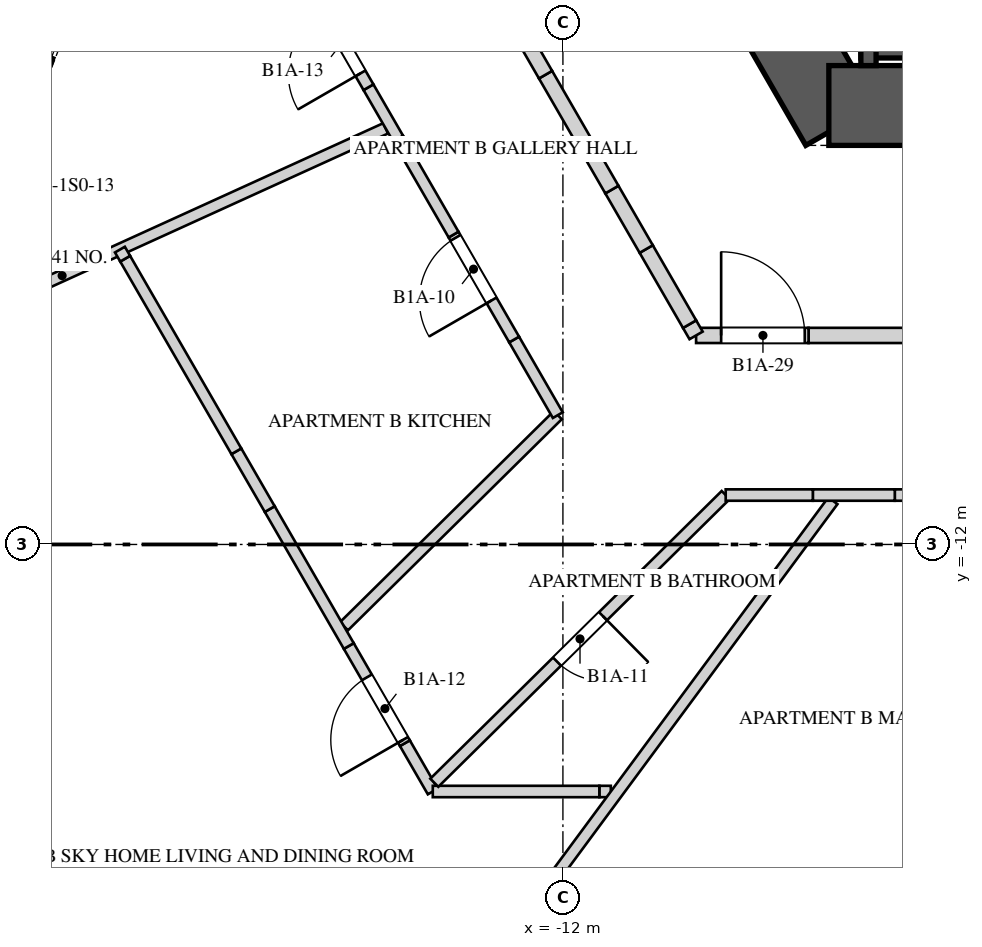
"""IFC4 building model, lengths in metres.
Left out: names, types, materials, properties, quantities, classifications, styles, units other than length and angle.
Written with IfcOpenShell. Run it as: python <this file> out.ifc"""

import sys

from ifc_helpers import new_model, si_unit, direction, frame, frame_2d, origin, place, context, subcontext, project, spatial, polyline, rectangle, outline, extrude, element, fill, save


model = new_model("IFC4")
c1 = context("Model", 3, precision=1e-05, world=origin(), true_north=direction((0.0, 1.0)))
c2 = subcontext(c1, "Body", "Model", "MODEL_VIEW")
j1 = project(units=[si_unit("LENGTHUNIT", "METRE"), si_unit("PLANEANGLEUNIT", "RADIAN")], contexts=[c1])
p1 = place(None, origin())
s1 = spatial("IfcSite", under=j1, at=p1, CompositionType="ELEMENT")
p2 = place(p1, origin())
s2 = spatial("IfcBuilding", under=s1, at=p2, CompositionType="ELEMENT")
p3 = place(p2, frame((0.0, 0.0, 51.2)))
s3 = spatial("IfcBuildingStorey", under=s2, at=p3, CompositionType="ELEMENT", Elevation=51.2)
p4 = place(p3, frame((-9.793, -3.988, 0.0), z_axis=(0.0, 0.0, 1.0), x_axis=(0.499995765644, -0.866027848477, 0.0)))
e1 = element("IfcWall", 1, at=p4, inside=s3, PredefinedType="SHEAR", context=c2, shape_type="SweptSolid", body=[
    extrude(rectangle(XDim=2.887, YDim=1.05, at=frame_2d((1.443, 0.0))), origin(), (0.0, 0.0, 1.0), 4.0),
])
p5 = place(p3, frame((-8.501, -6.225, 0.0), z_axis=(0.0, 0.0, 1.0), x_axis=(1.0, 0.0, 0.0)))
e2 = element("IfcWall", 2, at=p5, inside=s3, PredefinedType="SHEAR", context=c2, shape_type="SweptSolid", body=[
    extrude(rectangle(XDim=17.003, YDim=1.05, at=frame_2d((8.501, 0.0))), origin(), (0.0, 0.0, 1.0), 4.0),
])
p6 = place(p5, frame((6.707, 0.0, 0.0)))
e3 = element("IfcOpeningElement", 3, at=p6, cuts=e2, PredefinedType="OPENING", context=c2, shape_type="SweptSolid", body=[
    extrude(rectangle(XDim=1.0, YDim=2.4, at=frame_2d((0.5, 1.2))), frame((0.0, 0.535, 0.0), z_axis=(0.0, -1.0, 0.0), x_axis=(1.0, 0.0, 0.0)), (0.0, 0.0, 1.0), 1.07),
])
p7 = place(p3, frame((-21.601, -4.65, 0.0), z_axis=(0.0, 0.0, 1.0), x_axis=(0.933580593625, -0.358367514161, 0.0)))
e4 = element("IfcWall", 4, at=p7, inside=s3, PredefinedType="SOLIDWALL", context=c2, shape_type="SweptSolid", body=[
    extrude(rectangle(XDim=3.05, YDim=0.3, at=frame_2d((1.525, 0.0))), origin(), (0.0, 0.0, 1.0), 3.3),
])
p8 = place(p3, frame((-8.08, -5.475, 0.0), z_axis=(0.0, 0.0, 1.0), x_axis=(1.0, 0.0, 0.0)))
e5 = element("IfcWall", 5, at=p8, inside=s3, PredefinedType="SOLIDWALL", context=c2, shape_type="SweptSolid", body=[
    extrude(rectangle(XDim=6.2, YDim=0.25, at=frame_2d((3.1, 0.0))), origin(), (0.0, 0.0, 1.0), 3.65),
])
p9 = place(p3, frame((-7.98, -2.422, 0.0), z_axis=(0.0, 0.0, 1.0), x_axis=(0.0, -1.0, 0.0)))
e6 = element("IfcWall", 6, at=p9, inside=s3, PredefinedType="SOLIDWALL", context=c2, shape_type="SweptSolid", body=[
    extrude(rectangle(XDim=3.278, YDim=0.2, at=frame_2d((1.639, 0.0))), origin(), (0.0, 0.0, 1.0), 3.65),
])
p10 = place(p3, frame((-22.845, -10.402, 0.0), z_axis=(0.0, 0.0, 1.0), x_axis=(0.910101702386, 0.414384955463, 0.0)))
e7 = element("IfcWall", 7, at=p10, inside=s3, PredefinedType="PARTITIONING", context=c2, shape_type="SweptSolid", body=[
    extrude(rectangle(XDim=9.354, YDim=0.15, at=frame_2d((4.677, 0.0))), origin(), (0.0, 0.0, 1.0), 2.75),
])
p11 = place(p3, frame((-14.88, -13.076, 0.0), z_axis=(0.0, 0.0, 1.0), x_axis=(0.711570024915, 0.702615186032, 0.0)))
e8 = element("IfcWall", 8, at=p11, inside=s3, PredefinedType="PARTITIONING", context=c2, shape_type="SweptSolid", body=[
    extrude(rectangle(XDim=3.953, YDim=0.15, at=frame_2d((1.977, 0.0))), origin(), (0.0, 0.0, 1.0), 3.65),
])
p12 = place(p3, frame((-13.712, -15.25, 0.0), z_axis=(0.0, 0.0, 1.0), x_axis=(-0.500039236423, 0.86600274944, 0.0)))
e9 = element("IfcWall", 9, at=p12, inside=s3, PredefinedType="PARTITIONING", context=c2, shape_type="SweptSolid", body=[
    extrude(rectangle(XDim=0.734, YDim=0.15, at=frame_2d((0.367, 0.0))), origin(), (0.0, 0.0, 1.0), 3.65),
])
p13 = place(p3, frame((-14.079, -14.615, 0.0), z_axis=(0.0, 0.0, 1.0), x_axis=(-0.499927643558, 0.866067174765, 0.0)))
e10 = element("IfcWall", 10, at=p13, inside=s3, PredefinedType="PARTITIONING", context=c2, shape_type="SweptSolid", body=[
    extrude(outline(polyline([(0.0, 0.0), (1.476, 0.0), (1.476, 2.55), (0.577, 2.55), (0.577, 3.65), (0.0, 3.65), (0.0, 0.0)])), frame((0.0, 0.075, 0.0), z_axis=(0.0, -1.0, 0.0), x_axis=(1.0, 0.0, 0.0)), (0.0, 0.0, 1.0), 0.15),
])
p14 = place(p13, frame((0.05, 0.0, 0.0)))
e11 = element("IfcOpeningElement", 11, at=p14, cuts=e10, PredefinedType="OPENING", context=c2, shape_type="SweptSolid", body=[
    extrude(rectangle(XDim=0.95, YDim=2.4, at=frame_2d((0.475, 1.2))), frame((0.0, 0.085, 0.0), z_axis=(0.0, -1.0, 0.0), x_axis=(1.0, 0.0, 0.0)), (0.0, 0.0, 1.0), 0.17),
])
p15 = place(p3, frame((-14.817, -13.336, 0.0), z_axis=(0.0, 0.0, 1.0), x_axis=(-0.500027264788, 0.866009661879, 0.0)))
e12 = element("IfcWall", 12, at=p15, inside=s3, PredefinedType="PARTITIONING", context=c2, shape_type="SweptSolid", body=[
    extrude(rectangle(XDim=2.08, YDim=0.15, at=frame_2d((1.04, 0.0))), origin(), (0.0, 0.0, 1.0), 3.65),
])
p16 = place(p3, frame((-15.857, -11.535, 0.0), z_axis=(0.0, 0.0, 1.0), x_axis=(-0.49990697594, 0.86607910459, 0.0)))
e13 = element("IfcWall", 13, at=p16, inside=s3, PredefinedType="PARTITIONING", context=c2, shape_type="SweptSolid", body=[
    extrude(rectangle(XDim=0.878, YDim=0.15, at=frame_2d((0.439, 0.0))), origin(), (0.0, 0.0, 1.0), 2.55),
])
p17 = place(p3, frame((-16.296, -10.774, 0.0), z_axis=(0.0, 0.0, 1.0), x_axis=(-0.499980071345, 0.866036909293, 0.0)))
e14 = element("IfcWall", 14, at=p17, inside=s3, PredefinedType="PARTITIONING", context=c2, shape_type="SweptSolid", body=[
    extrude(rectangle(XDim=2.926, YDim=0.15, at=frame_2d((1.463, 0.0))), origin(), (0.0, 0.0, 1.0), 3.65),
])
p18 = place(p3, frame((-17.759, -8.24, 0.0), z_axis=(0.0, 0.0, 1.0), x_axis=(-0.500896724159, 0.865507060472, 0.0)))
e15 = element("IfcWall", 15, at=p18, inside=s3, PredefinedType="PARTITIONING", context=c2, shape_type="SweptSolid", body=[
    extrude(rectangle(XDim=0.138, YDim=0.15, at=frame_2d((0.069, 0.0))), origin(), (0.0, 0.0, 1.0), 2.75),
])
p19 = place(p3, frame((-12.067, -10.299, 0.0), z_axis=(0.0, 0.0, 1.0), x_axis=(-0.499955427682, 0.866051136095, 0.0)))
e16 = element("IfcWall", 16, at=p19, inside=s3, PredefinedType="PARTITIONING", context=c2, shape_type="SweptSolid", body=[
    extrude(rectangle(XDim=1.149, YDim=0.15, at=frame_2d((0.574, 0.0))), origin(), (0.0, 0.0, 1.0), 3.65),
])
p20 = place(p3, frame((-12.642, -9.304, 0.0), z_axis=(0.0, 0.0, 1.0), x_axis=(-0.499961121316, 0.86604784924, 0.0)))
e17 = element("IfcWall", 17, at=p20, inside=s3, PredefinedType="PARTITIONING", context=c2, shape_type="SweptSolid", body=[
    extrude(outline(polyline([(0.0, 0.0), (1.594, 0.0), (1.594, 3.65), (0.878, 3.65), (0.878, 2.55), (0.0, 2.55), (0.0, 0.0)])), frame((0.0, 0.075, 0.0), z_axis=(0.0, -1.0, 0.0), x_axis=(1.0, 0.0, 0.0)), (0.0, 0.0, 1.0), 0.15),
])
p21 = place(p20, frame((0.594, 0.0, 0.0)))
e18 = element("IfcOpeningElement", 18, at=p21, cuts=e17, PredefinedType="OPENING", context=c2, shape_type="SweptSolid", body=[
    extrude(rectangle(XDim=0.95, YDim=2.4, at=frame_2d((0.475, 1.2))), frame((0.0, 0.085, 0.0), z_axis=(0.0, -1.0, 0.0), x_axis=(1.0, 0.0, 0.0)), (0.0, 0.0, 1.0), 0.17),
])
p22 = place(p3, frame((-13.439, -7.923, 0.0), z_axis=(0.0, 0.0, 1.0), x_axis=(-0.500026652407, 0.866010015463, 0.0)))
e19 = element("IfcWall", 19, at=p22, inside=s3, PredefinedType="PARTITIONING", context=c2, shape_type="SweptSolid", body=[
    extrude(rectangle(XDim=1.459, YDim=0.15, at=frame_2d((0.729, 0.0))), origin(), (0.0, 0.0, 1.0), 3.65),
])
p23 = place(p3, frame((-14.168, -6.66, 0.0), z_axis=(0.0, 0.0, 1.0), x_axis=(-0.500011542666, 0.866018739521, 0.0)))
e20 = element("IfcWall", 20, at=p23, inside=s3, PredefinedType="PARTITIONING", context=c2, shape_type="SweptSolid", body=[
    extrude(rectangle(XDim=0.78, YDim=0.15, at=frame_2d((0.39, 0.0))), origin(), (0.0, 0.0, 1.0), 2.75),
])
p24 = place(p3, frame((-14.558, -5.985, 0.0), z_axis=(0.0, 0.0, 1.0), x_axis=(-0.499993265928, 0.866029291668, 0.0)))
e21 = element("IfcWall", 21, at=p24, inside=s3, PredefinedType="PARTITIONING", context=c2, shape_type="SweptSolid", body=[
    extrude(rectangle(XDim=2.003, YDim=0.15, at=frame_2d((1.001, 0.0))), origin(), (0.0, 0.0, 1.0), 3.65),
])
p25 = place(p24, frame((0.211, 0.0, 0.0)))
e22 = element("IfcOpeningElement", 22, at=p25, cuts=e21, PredefinedType="OPENING", context=c2, shape_type="SweptSolid", body=[
    extrude(rectangle(XDim=0.95, YDim=2.4, at=frame_2d((0.475, 1.2))), frame((0.0, 0.085, 0.0), z_axis=(0.0, -1.0, 0.0), x_axis=(1.0, 0.0, 0.0)), (0.0, 0.0, 1.0), 0.17),
])
p26 = place(p3, frame((-11.37, -15.25, 0.0), z_axis=(0.0, 0.0, 1.0), x_axis=(-1.0, 0.0, 0.0)))
e23 = element("IfcWall", 23, at=p26, inside=s3, PredefinedType="PARTITIONING", context=c2, shape_type="SweptSolid", body=[
    extrude(rectangle(XDim=0.151, YDim=0.15, at=frame_2d((0.075, 0.0))), origin(), (0.0, 0.0, 1.0), 2.55),
])
p27 = place(p3, frame((-11.521, -15.25, 0.0), z_axis=(0.0, 0.0, 1.0), x_axis=(-1.0, 0.0, 0.0)))
e24 = element("IfcWall", 24, at=p27, inside=s3, PredefinedType="PARTITIONING", context=c2, shape_type="SweptSolid", body=[
    extrude(rectangle(XDim=2.192, YDim=0.15, at=frame_2d((1.096, 0.0))), origin(), (0.0, 0.0, 1.0), 3.65),
])
p28 = place(p3, frame((-9.858, -11.35, 0.0), z_axis=(0.0, 0.0, 1.0), x_axis=(-0.711601660906, -0.702583145397, 0.0)))
e25 = element("IfcWall", 25, at=p28, inside=s3, PredefinedType="PARTITIONING", context=c2, shape_type="SweptSolid", body=[
    extrude(rectangle(XDim=5.387, YDim=0.15, at=frame_2d((2.694, 0.0))), origin(), (0.0, 0.0, 1.0), 3.65),
])
p29 = place(p28, frame((2.269, 0.0, 0.0)))
e26 = element("IfcOpeningElement", 26, at=p29, cuts=e25, PredefinedType="OPENING", context=c2, shape_type="SweptSolid", body=[
    extrude(rectangle(XDim=0.85, YDim=2.4, at=frame_2d((0.425, 1.2))), frame((0.0, 0.085, 0.0), z_axis=(0.0, -1.0, 0.0), x_axis=(1.0, 0.0, 0.0)), (0.0, 0.0, 1.0), 0.17),
])
p30 = place(p3, frame((-8.448, -11.425, 0.0), z_axis=(0.0, 0.0, 1.0), x_axis=(-0.594567506499, -0.804045695353, 0.0)))
e27 = element("IfcWall", 27, at=p30, inside=s3, PredefinedType="PARTITIONING", context=c2, shape_type="SweptSolid", body=[
    extrude(rectangle(XDim=10.893, YDim=0.15, at=frame_2d((5.446, 0.0))), origin(), (0.0, 0.0, 1.0), 2.55),
])
p31 = place(p3, frame((-3.957, -11.35, 0.0), z_axis=(0.0, 0.0, 1.0), x_axis=(-1.0, 0.0, 0.0)))
e28 = element("IfcWall", 28, at=p31, inside=s3, PredefinedType="PARTITIONING", context=c2, shape_type="SweptSolid", body=[
    extrude(rectangle(XDim=3.677, YDim=0.15, at=frame_2d((1.839, 0.0))), origin(), (0.0, 0.0, 1.0), 3.65),
])
p32 = place(p31, frame((1.604, 0.0, 0.0)))
e29 = element("IfcOpeningElement", 29, at=p32, cuts=e28, PredefinedType="OPENING", context=c2, shape_type="SweptSolid", body=[
    extrude(rectangle(XDim=0.95, YDim=2.4, at=frame_2d((0.475, 1.2))), frame((0.0, 0.085, 0.0), z_axis=(0.0, -1.0, 0.0), x_axis=(1.0, 0.0, 0.0)), (0.0, 0.0, 1.0), 0.17),
])
p33 = place(p3, frame((-7.634, -11.35, 0.0), z_axis=(0.0, 0.0, 1.0), x_axis=(-1.0, 0.0, 0.0)))
e30 = element("IfcWall", 30, at=p33, inside=s3, PredefinedType="PARTITIONING", context=c2, shape_type="SweptSolid", body=[
    extrude(rectangle(XDim=1.078, YDim=0.15, at=frame_2d((0.539, 0.0))), origin(), (0.0, 0.0, 1.0), 2.55),
])
p34 = place(p3, frame((-8.712, -11.35, 0.0), z_axis=(0.0, 0.0, 1.0), x_axis=(-1.0, 0.0, 0.0)))
e31 = element("IfcWall", 31, at=p34, inside=s3, PredefinedType="PARTITIONING", context=c2, shape_type="SweptSolid", body=[
    extrude(rectangle(XDim=1.146, YDim=0.15, at=frame_2d((0.573, 0.0))), origin(), (0.0, 0.0, 1.0), 3.65),
])
p35 = place(p3, frame((-7.215, -9.25, 0.0), z_axis=(0.0, 0.0, 1.0), x_axis=(-1.0, 0.0, 0.0)))
e32 = element("IfcWall", 32, at=p35, inside=s3, PredefinedType="SOLIDWALL", context=c2, shape_type="SweptSolid", body=[
    extrude(rectangle(XDim=1.553, YDim=0.2, at=frame_2d((0.776, 0.0))), origin(), (0.0, 0.0, 1.0), 3.65),
])
p36 = place(p3, frame((-10.248, -9.25, 0.0), z_axis=(0.0, 0.0, 1.0), x_axis=(1.0, 0.0, 0.0)))
e33 = element("IfcWall", 33, at=p36, inside=s3, PredefinedType="SOLIDWALL", context=c2, shape_type="SweptSolid", body=[
    extrude(outline(polyline([(0.0, 0.0), (1.48, 0.0), (1.479, 3.65), (1.07, 3.65), (1.07, 2.55), (0.0, 2.55), (0.0, 0.0)])), frame((0.0, 0.1, 0.0), z_axis=(0.0, -1.0, 0.0), x_axis=(1.0, 0.0, 0.0)), (0.0, 0.0, 1.0), 0.2),
])
p37 = place(p36, frame((0.33, 0.0, 0.0)))
e34 = element("IfcOpeningElement", 34, at=p37, cuts=e33, PredefinedType="OPENING", context=c2, shape_type="SweptSolid", body=[
    extrude(rectangle(XDim=1.1, YDim=2.4, at=frame_2d((0.55, 1.2))), frame((0.0, 0.11, 0.0), z_axis=(0.0, -1.0, 0.0), x_axis=(1.0, 0.0, 0.0)), (0.0, 0.0, 1.0), 0.22),
])
p38 = place(p3, frame((-10.248, -9.25, 0.0), z_axis=(0.0, 0.0, 1.0), x_axis=(-0.499516518495, 0.866304362075, 0.0)))
e35 = element("IfcWall", 35, at=p38, inside=s3, PredefinedType="SOLIDWALL", context=c2, shape_type="SweptSolid", body=[
    extrude(rectangle(XDim=0.171, YDim=0.2, at=frame_2d((0.085, 0.0))), origin(), (0.0, 0.0, 1.0), 2.55),
])
p39 = place(p3, frame((-10.333, -9.102, 0.0), z_axis=(0.0, 0.0, 1.0), x_axis=(-0.500049527193, 0.865996807358, 0.0)))
e36 = element("IfcWall", 36, at=p39, inside=s3, PredefinedType="SOLIDWALL", context=c2, shape_type="SweptSolid", body=[
    extrude(rectangle(XDim=1.142, YDim=0.2, at=frame_2d((0.571, 0.0))), origin(), (0.0, 0.0, 1.0), 3.65),
])
p40 = place(p3, frame((-10.904, -8.113, 0.0), z_axis=(0.0, 0.0, 1.0), x_axis=(-0.499948710669, 0.866055013668, 0.0)))
e37 = element("IfcWall", 37, at=p40, inside=s3, PredefinedType="SOLIDWALL", context=c2, shape_type="SweptSolid", body=[
    extrude(rectangle(XDim=0.903, YDim=0.2, at=frame_2d((0.451, 0.0))), origin(), (0.0, 0.0, 1.0), 2.55),
])
p41 = place(p3, frame((-11.356, -7.331, 0.0), z_axis=(0.0, 0.0, 1.0), x_axis=(-0.50000494408, 0.866022549299, 0.0)))
e38 = element("IfcWall", 38, at=p41, inside=s3, PredefinedType="SOLIDWALL", context=c2, shape_type="SweptSolid", body=[
    extrude(rectangle(XDim=1.746, YDim=0.2, at=frame_2d((0.873, 0.0))), origin(), (0.0, 0.0, 1.0), 3.65),
])
p42 = place(p3, frame((-12.229, -5.82, 0.0), z_axis=(0.0, 0.0, 1.0), x_axis=(-0.499923776705, 0.866069406852, 0.0)))
e39 = element("IfcWall", 39, at=p42, inside=s3, PredefinedType="SOLIDWALL", context=c2, shape_type="SweptSolid", body=[
    extrude(rectangle(XDim=0.805, YDim=0.2, at=frame_2d((0.402, 0.0))), origin(), (0.0, 0.0, 1.0), 2.75),
])
p43 = place(p21, origin())
e40 = element("IfcDoor", 40, at=p43, inside=s3, OperationType="SINGLE_SWING_RIGHT", PredefinedType="DOOR", context=c2, shape_type="SweptSolid", body=[
    extrude(rectangle(XDim=0.95, YDim=2.4, at=frame_2d((0.475, 1.2))), frame((0.0, 0.025, 0.0), z_axis=(0.0, -1.0, 0.0), x_axis=(1.0, 0.0, 0.0)), (0.0, 0.0, 1.0), 0.05),
])
fill(e18, e40)
p44 = place(p29, origin())
e41 = element("IfcDoor", 41, at=p44, inside=s3, OperationType="SINGLE_SWING_LEFT", PredefinedType="DOOR", context=c2, shape_type="SweptSolid", body=[
    extrude(rectangle(XDim=0.85, YDim=2.4, at=frame_2d((0.425, 1.2))), frame((0.0, 0.025, 0.0), z_axis=(0.0, -1.0, 0.0), x_axis=(1.0, 0.0, 0.0)), (0.0, 0.0, 1.0), 0.05),
])
fill(e26, e41)
p45 = place(p14, origin())
e42 = element("IfcDoor", 42, at=p45, inside=s3, OperationType="SINGLE_SWING_RIGHT", PredefinedType="DOOR", context=c2, shape_type="SweptSolid", body=[
    extrude(rectangle(XDim=0.95, YDim=2.4, at=frame_2d((0.475, 1.2))), frame((0.0, 0.025, 0.0), z_axis=(0.0, -1.0, 0.0), x_axis=(1.0, 0.0, 0.0)), (0.0, 0.0, 1.0), 0.05),
])
fill(e11, e42)
p46 = place(p25, origin())
e43 = element("IfcDoor", 43, at=p46, inside=s3, OperationType="SINGLE_SWING_LEFT", PredefinedType="DOOR", context=c2, shape_type="SweptSolid", body=[
    extrude(rectangle(XDim=0.95, YDim=2.4, at=frame_2d((0.475, 1.2))), frame((0.0, 0.025, 0.0), z_axis=(0.0, -1.0, 0.0), x_axis=(1.0, 0.0, 0.0)), (0.0, 0.0, 1.0), 0.05),
])
fill(e22, e43)
p47 = place(p37, origin())
e44 = element("IfcDoor", 44, at=p47, inside=s3, OperationType="SINGLE_SWING_LEFT", PredefinedType="DOOR", context=c2, shape_type="SweptSolid", body=[
    extrude(rectangle(XDim=1.1, YDim=2.4, at=frame_2d((0.55, 1.2))), frame((0.0, 0.025, 0.0), z_axis=(0.0, -1.0, 0.0), x_axis=(1.0, 0.0, 0.0)), (0.0, 0.0, 1.0), 0.05),
])
fill(e34, e44)
save(model, sys.argv[1])
